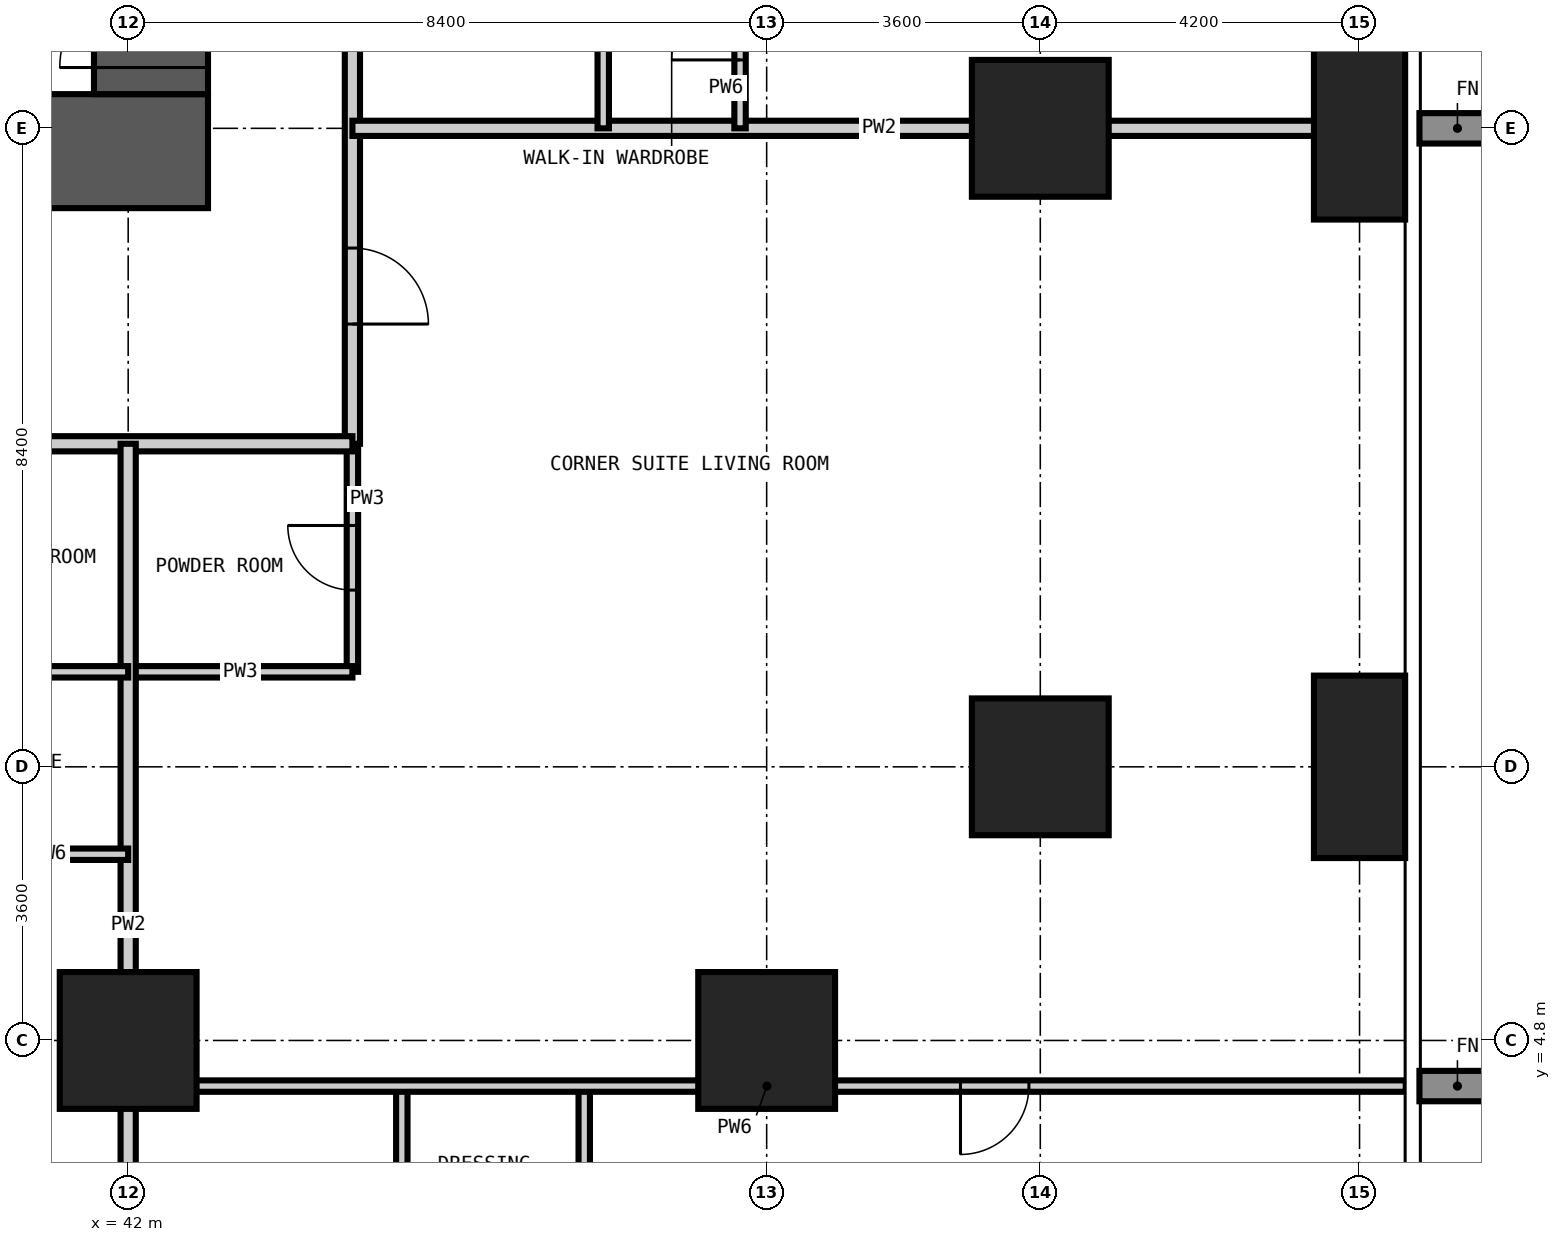
"""IFC4 building model, lengths in metres.
Left out: names, types, materials, properties, quantities, classifications, styles, units other than length and angle.
Written with IfcOpenShell. Run it as: python <this file> out.ifc"""

import sys

from ifc_helpers import new_model, si_unit, direction, frame, frame_2d, origin, origin_2d, place, context, subcontext, project, spatial, rectangle, extrude, element, fill, save


model = new_model("IFC4")
c1 = context("Model", 3, precision=1e-05, world=origin(), true_north=direction((0.0, 1.0)))
c2 = subcontext(c1, "Body", "Model", "MODEL_VIEW")
j1 = project(units=[si_unit("LENGTHUNIT", "METRE"), si_unit("PLANEANGLEUNIT", "RADIAN")], contexts=[c1])
p1 = place(None, origin())
s1 = spatial("IfcSite", under=j1, at=p1, CompositionType="ELEMENT")
p2 = place(p1, origin())
s2 = spatial("IfcBuilding", under=s1, at=p2, CompositionType="ELEMENT")
p3 = place(p2, frame((0.0, 0.0, 52.2)))
s3 = spatial("IfcBuildingStorey", under=s2, at=p3, CompositionType="ELEMENT", Elevation=52.2)
for number, where, z_axis, x_axis in (
    (1, (42.0, 4.8, -0.35), (0.0, 0.0, 1.0), (1.0, 0.0, 0.0)),
    (2, (50.4, 4.8, -0.35), (0.0, 0.0, 1.0), (1.0, 0.0, 0.0)),
    (3, (54.0, 8.4, -0.35), (0.0, 0.0, 1.0), (1.0, 0.0, 0.0)),
    (4, (54.0, 16.8, -0.35), (0.0, 0.0, 1.0), (1.0, 0.0, 0.0)),
):
    element("IfcColumn", number, at=place(p3, frame(where, z_axis=z_axis, x_axis=x_axis)), inside=s3, PredefinedType="COLUMN", context=c2, shape_type="SweptSolid", body=[
        extrude(rectangle(XDim=1.8, YDim=1.8, at=origin_2d()), origin(), (0.0, 0.0, 1.0), 3.6),
    ])
for number, where, z_axis, x_axis in (
    (5, (58.2, 8.4, -0.35), (0.0, 0.0, 1.0), (1.0, 0.0, 0.0)),
    (6, (58.2, 16.8, -0.35), (0.0, 0.0, 1.0), (1.0, 0.0, 0.0)),
):
    element("IfcColumn", number, at=place(p3, frame(where, z_axis=z_axis, x_axis=x_axis)), inside=s3, PredefinedType="COLUMN", context=c2, shape_type="SweptSolid", body=[
        extrude(rectangle(XDim=1.2, YDim=2.4, at=origin_2d()), origin(), (0.0, 0.0, 1.0), 3.6),
    ])
p4 = place(p3, frame((15.75, 16.5, -0.35), z_axis=(0.0, 0.0, 1.0), x_axis=(1.0, 0.0, 0.0)))
e7 = element("IfcWall", 7, at=p4, inside=s3, PredefinedType="SHEAR", context=c2, shape_type="SweptSolid", body=[
    extrude(rectangle(XDim=27.3, YDim=1.5, at=frame_2d((13.65, 0.0))), origin(), (0.0, 0.0, 1.0), 3.6),
])
p5 = place(p4, frame((13.15, 0.0, 0.35)))
e8 = element("IfcOpeningElement", 8, at=p5, cuts=e7, PredefinedType="OPENING", context=c2, shape_type="SweptSolid", body=[
    extrude(rectangle(XDim=1.0, YDim=2.1, at=frame_2d((0.5, 1.05))), frame((0.0, 0.76, 0.0), z_axis=(0.0, -1.0, 0.0), x_axis=(1.0, 0.0, 0.0)), (0.0, 0.0, 1.0), 1.52),
])
p6 = place(p4, frame((19.45, 0.0, 0.35)))
e9 = element("IfcOpeningElement", 9, at=p6, cuts=e7, PredefinedType="OPENING", context=c2, shape_type="SweptSolid", body=[
    extrude(rectangle(XDim=1.0, YDim=2.1, at=frame_2d((0.5, 1.05))), frame((0.0, 0.76, 0.0), z_axis=(0.0, -1.0, 0.0), x_axis=(1.0, 0.0, 0.0)), (0.0, 0.0, 1.0), 1.52),
])
p7 = place(p3, frame((42.3, 17.25, -0.35), z_axis=(0.0, 0.0, 1.0), x_axis=(0.0, 1.0, 0.0)))
e10 = element("IfcWall", 10, at=p7, inside=s3, PredefinedType="SHEAR", context=c2, shape_type="SweptSolid", body=[
    extrude(rectangle(XDim=24.3, YDim=1.5, at=frame_2d((12.15, 0.0))), origin(), (0.0, 0.0, 1.0), 3.6),
])
p8 = place(p7, frame((0.35, 0.0, 0.35)))
e11 = element("IfcOpeningElement", 11, at=p8, cuts=e10, PredefinedType="OPENING", context=c2, shape_type="SweptSolid", body=[
    extrude(rectangle(XDim=1.2, YDim=2.2, at=frame_2d((0.6, 1.1))), frame((0.0, 0.76, 0.0), z_axis=(0.0, -1.0, 0.0), x_axis=(1.0, 0.0, 0.0)), (0.0, 0.0, 1.0), 1.52),
])
p9 = place(p7, frame((11.65, 0.0, 0.35)))
e12 = element("IfcOpeningElement", 12, at=p9, cuts=e10, PredefinedType="OPENING", context=c2, shape_type="SweptSolid", body=[
    extrude(rectangle(XDim=1.0, YDim=2.1, at=frame_2d((0.5, 1.05))), frame((0.0, 0.76, 0.0), z_axis=(0.0, -1.0, 0.0), x_axis=(1.0, 0.0, 0.0)), (0.0, 0.0, 1.0), 1.52),
])
p10 = place(p7, frame((20.05, 0.0, 0.35)))
e13 = element("IfcOpeningElement", 13, at=p10, cuts=e10, PredefinedType="OPENING", context=c2, shape_type="SweptSolid", body=[
    extrude(rectangle(XDim=1.0, YDim=2.1, at=frame_2d((0.5, 1.05))), frame((0.0, 0.76, 0.0), z_axis=(0.0, -1.0, 0.0), x_axis=(1.0, 0.0, 0.0)), (0.0, 0.0, 1.0), 1.52),
])
p11 = place(p3, frame((44.95, 9.65, 0.0), z_axis=(0.0, 0.0, 1.0), x_axis=(0.0, 1.0, 0.0)))
e14 = element("IfcWall", 14, at=p11, inside=s3, PredefinedType="PARTITIONING", context=c2, shape_type="SweptSolid", body=[
    extrude(rectangle(XDim=3.0, YDim=0.15, at=frame_2d((1.5, 0.0))), origin(), (0.0, 0.0, 1.0), 3.25),
])
p12 = place(p11, frame((1.075, 0.0, 0.0)))
e15 = element("IfcOpeningElement", 15, at=p12, cuts=e14, PredefinedType="OPENING", context=c2, shape_type="SweptSolid", body=[
    extrude(rectangle(XDim=0.85, YDim=2.1, at=frame_2d((0.425, 1.05))), frame((0.0, 0.085, 0.0), z_axis=(0.0, -1.0, 0.0), x_axis=(1.0, 0.0, 0.0)), (0.0, 0.0, 1.0), 0.17),
])
p13 = place(p3, frame((42.0, 9.65, 0.0), z_axis=(0.0, 0.0, 1.0), x_axis=(1.0, 0.0, 0.0)))
e16 = element("IfcWall", 16, at=p13, inside=s3, PredefinedType="PARTITIONING", context=c2, shape_type="SweptSolid", body=[
    extrude(rectangle(XDim=2.95, YDim=0.15, at=frame_2d((1.475, 0.0))), origin(), (0.0, 0.0, 1.0), 3.25),
])
p14 = place(p3, frame((44.95, 45.55, 0.0), z_axis=(0.0, 0.0, 1.0), x_axis=(0.0, -1.0, 0.0)))
e17 = element("IfcWall", 17, at=p14, inside=s3, PredefinedType="PARTITIONING", context=c2, shape_type="SweptSolid", body=[
    extrude(rectangle(XDim=32.9, YDim=0.2, at=frame_2d((16.45, 0.0))), origin(), (0.0, 0.0, 1.0), 3.25),
])
p15 = place(p14, frame((24.8, 0.0, 0.0)))
e18 = element("IfcOpeningElement", 18, at=p15, cuts=e17, PredefinedType="OPENING", context=c2, shape_type="SweptSolid", body=[
    extrude(rectangle(XDim=1.0, YDim=2.2, at=frame_2d((0.5, 1.1))), frame((0.0, 0.11, 0.0), z_axis=(0.0, -1.0, 0.0), x_axis=(1.0, 0.0, 0.0)), (0.0, 0.0, 1.0), 0.22),
])
p16 = place(p14, frame((19.85, 0.0, 0.0)))
e19 = element("IfcOpeningElement", 19, at=p16, cuts=e17, PredefinedType="OPENING", context=c2, shape_type="SweptSolid", body=[
    extrude(rectangle(XDim=1.0, YDim=2.2, at=frame_2d((0.5, 1.1))), frame((0.0, 0.11, 0.0), z_axis=(0.0, -1.0, 0.0), x_axis=(1.0, 0.0, 0.0)), (0.0, 0.0, 1.0), 0.22),
])
p17 = place(p14, frame((11.45, 0.0, 0.0)))
e20 = element("IfcOpeningElement", 20, at=p17, cuts=e17, PredefinedType="OPENING", context=c2, shape_type="SweptSolid", body=[
    extrude(rectangle(XDim=1.0, YDim=2.2, at=frame_2d((0.5, 1.1))), frame((0.0, 0.11, 0.0), z_axis=(0.0, -1.0, 0.0), x_axis=(1.0, 0.0, 0.0)), (0.0, 0.0, 1.0), 0.22),
])
p18 = place(p14, frame((6.5, 0.0, 0.0)))
e21 = element("IfcOpeningElement", 21, at=p18, cuts=e17, PredefinedType="OPENING", context=c2, shape_type="SweptSolid", body=[
    extrude(rectangle(XDim=1.0, YDim=2.2, at=frame_2d((0.5, 1.1))), frame((0.0, 0.11, 0.0), z_axis=(0.0, -1.0, 0.0), x_axis=(1.0, 0.0, 0.0)), (0.0, 0.0, 1.0), 0.22),
])
p19 = place(p14, frame((30.325, 0.0, 0.0)))
e22 = element("IfcOpeningElement", 22, at=p19, cuts=e17, PredefinedType="OPENING", context=c2, shape_type="SweptSolid", body=[
    extrude(rectangle(XDim=1.0, YDim=2.2, at=frame_2d((0.5, 1.1))), frame((0.0, 0.11, 0.0), z_axis=(0.0, -1.0, 0.0), x_axis=(1.0, 0.0, 0.0)), (0.0, 0.0, 1.0), 0.22),
])
p20 = place(p14, frame((1.275, 0.0, 0.0)))
e23 = element("IfcOpeningElement", 23, at=p20, cuts=e17, PredefinedType="OPENING", context=c2, shape_type="SweptSolid", body=[
    extrude(rectangle(XDim=1.0, YDim=2.2, at=frame_2d((0.5, 1.1))), frame((0.0, 0.11, 0.0), z_axis=(0.0, -1.0, 0.0), x_axis=(1.0, 0.0, 0.0)), (0.0, 0.0, 1.0), 0.22),
])
p21 = place(p3, frame((44.95, 12.65, 0.0), z_axis=(0.0, 0.0, 1.0), x_axis=(-1.0, 0.0, 0.0)))
e24 = element("IfcWall", 24, at=p21, inside=s3, PredefinedType="PARTITIONING", context=c2, shape_type="SweptSolid", body=[
    extrude(rectangle(XDim=32.3, YDim=0.2, at=frame_2d((16.15, 0.0))), origin(), (0.0, 0.0, 1.0), 3.25),
])
p22 = place(p21, frame((24.35, 0.0, 0.0)))
e25 = element("IfcOpeningElement", 25, at=p22, cuts=e24, PredefinedType="OPENING", context=c2, shape_type="SweptSolid", body=[
    extrude(rectangle(XDim=1.0, YDim=2.2, at=frame_2d((0.5, 1.1))), frame((0.0, 0.11, 0.0), z_axis=(0.0, -1.0, 0.0), x_axis=(1.0, 0.0, 0.0)), (0.0, 0.0, 1.0), 0.22),
])
p23 = place(p21, frame((15.95, 0.0, 0.0)))
e26 = element("IfcOpeningElement", 26, at=p23, cuts=e24, PredefinedType="OPENING", context=c2, shape_type="SweptSolid", body=[
    extrude(rectangle(XDim=1.0, YDim=2.2, at=frame_2d((0.5, 1.1))), frame((0.0, 0.11, 0.0), z_axis=(0.0, -1.0, 0.0), x_axis=(1.0, 0.0, 0.0)), (0.0, 0.0, 1.0), 0.22),
])
p24 = place(p21, frame((7.55, 0.0, 0.0)))
e27 = element("IfcOpeningElement", 27, at=p24, cuts=e24, PredefinedType="OPENING", context=c2, shape_type="SweptSolid", body=[
    extrude(rectangle(XDim=1.0, YDim=2.2, at=frame_2d((0.5, 1.1))), frame((0.0, 0.11, 0.0), z_axis=(0.0, -1.0, 0.0), x_axis=(1.0, 0.0, 0.0)), (0.0, 0.0, 1.0), 0.22),
])
p25 = place(p3, frame((42.0, -0.008, 0.0), z_axis=(0.0, 0.0, 1.0), x_axis=(0.0, 1.0, 0.0)))
e28 = element("IfcWall", 28, at=p25, inside=s3, PredefinedType="PARTITIONING", context=c2, shape_type="SweptSolid", body=[
    extrude(rectangle(XDim=12.658, YDim=0.2, at=frame_2d((6.329, 0.0))), origin(), (0.0, 0.0, 1.0), 3.25),
])
p26 = place(p3, frame((44.95, 16.8, 0.0), z_axis=(0.0, 0.0, 1.0), x_axis=(1.0, 0.0, 0.0)))
e29 = element("IfcWall", 29, at=p26, inside=s3, PredefinedType="PARTITIONING", context=c2, shape_type="SweptSolid", body=[
    extrude(rectangle(XDim=13.858, YDim=0.2, at=frame_2d((6.929, 0.0))), origin(), (0.0, 0.0, 1.0), 3.25),
])
p27 = place(p3, frame((45.6, 1.2, 0.0), z_axis=(0.0, 0.0, 1.0), x_axis=(0.0, 1.0, 0.0)))
e30 = element("IfcWall", 30, at=p27, inside=s3, PredefinedType="PARTITIONING", context=c2, shape_type="SweptSolid", body=[
    extrude(rectangle(XDim=3.0, YDim=0.15, at=frame_2d((1.5, 0.0))), origin(), (0.0, 0.0, 1.0), 3.25),
])
p28 = place(p3, frame((48.0, 1.2, 0.0), z_axis=(0.0, 0.0, 1.0), x_axis=(0.0, 1.0, 0.0)))
e31 = element("IfcWall", 31, at=p28, inside=s3, PredefinedType="PARTITIONING", context=c2, shape_type="SweptSolid", body=[
    extrude(rectangle(XDim=3.0, YDim=0.15, at=frame_2d((1.5, 0.0))), origin(), (0.0, 0.0, 1.0), 3.25),
])
p29 = place(p28, frame((1.05, 0.0, 0.0)))
e32 = element("IfcOpeningElement", 32, at=p29, cuts=e31, PredefinedType="OPENING", context=c2, shape_type="SweptSolid", body=[
    extrude(rectangle(XDim=0.9, YDim=2.1, at=frame_2d((0.45, 1.05))), frame((0.0, 0.085, 0.0), z_axis=(0.0, -1.0, 0.0), x_axis=(1.0, 0.0, 0.0)), (0.0, 0.0, 1.0), 0.17),
])
p30 = place(p3, frame((48.25, 16.8, 0.0), z_axis=(0.0, 0.0, 1.0), x_axis=(0.0, 1.0, 0.0)))
e33 = element("IfcWall", 33, at=p30, inside=s3, PredefinedType="PARTITIONING", context=c2, shape_type="SweptSolid", body=[
    extrude(rectangle(XDim=2.7, YDim=0.15, at=frame_2d((1.35, 0.0))), origin(), (0.0, 0.0, 1.0), 3.25),
])
p31 = place(p3, frame((50.05, 16.8, 0.0), z_axis=(0.0, 0.0, 1.0), x_axis=(0.0, 1.0, 0.0)))
e34 = element("IfcWall", 34, at=p31, inside=s3, PredefinedType="PARTITIONING", context=c2, shape_type="SweptSolid", body=[
    extrude(rectangle(XDim=2.7, YDim=0.15, at=frame_2d((1.35, 0.0))), origin(), (0.0, 0.0, 1.0), 3.25),
])
p32 = place(p31, frame((0.9, 0.0, 0.0)))
e35 = element("IfcOpeningElement", 35, at=p32, cuts=e34, PredefinedType="OPENING", context=c2, shape_type="SweptSolid", body=[
    extrude(rectangle(XDim=0.9, YDim=2.1, at=frame_2d((0.45, 1.05))), frame((0.0, 0.085, 0.0), z_axis=(0.0, -1.0, 0.0), x_axis=(1.0, 0.0, 0.0)), (0.0, 0.0, 1.0), 0.17),
])
p33 = place(p3, frame((42.0, 4.2, 0.0), z_axis=(0.0, 0.0, 1.0), x_axis=(1.0, 0.0, 0.0)))
e36 = element("IfcWall", 36, at=p33, inside=s3, PredefinedType="PARTITIONING", context=c2, shape_type="SweptSolid", body=[
    extrude(rectangle(XDim=16.808, YDim=0.15, at=frame_2d((8.404, 0.0))), origin(), (0.0, 0.0, 1.0), 3.25),
])
p34 = place(p33, frame((10.95, 0.0, 0.0)))
e37 = element("IfcOpeningElement", 37, at=p34, cuts=e36, PredefinedType="OPENING", context=c2, shape_type="SweptSolid", body=[
    extrude(rectangle(XDim=0.9, YDim=2.1, at=frame_2d((0.45, 1.05))), frame((0.0, 0.085, 0.0), z_axis=(0.0, -1.0, 0.0), x_axis=(1.0, 0.0, 0.0)), (0.0, 0.0, 1.0), 0.17),
])
p35 = place(p3, frame((37.8, 7.25, 0.0), z_axis=(0.0, 0.0, 1.0), x_axis=(1.0, 0.0, 0.0)))
e38 = element("IfcWall", 38, at=p35, inside=s3, PredefinedType="PARTITIONING", context=c2, shape_type="SweptSolid", body=[
    extrude(rectangle(XDim=4.2, YDim=0.15, at=frame_2d((2.1, 0.0))), origin(), (0.0, 0.0, 1.0), 3.25),
])
p36 = place(p35, frame((1.65, 0.0, 0.0)))
e39 = element("IfcOpeningElement", 39, at=p36, cuts=e38, PredefinedType="OPENING", context=c2, shape_type="SweptSolid", body=[
    extrude(rectangle(XDim=0.9, YDim=2.1, at=frame_2d((0.45, 1.05))), frame((0.0, 0.085, 0.0), z_axis=(0.0, -1.0, 0.0), x_axis=(1.0, 0.0, 0.0)), (0.0, 0.0, 1.0), 0.17),
])
p37 = place(p3, frame((37.8, 9.65, 0.0), z_axis=(0.0, 0.0, 1.0), x_axis=(1.0, 0.0, 0.0)))
e40 = element("IfcWall", 40, at=p37, inside=s3, PredefinedType="PARTITIONING", context=c2, shape_type="SweptSolid", body=[
    extrude(rectangle(XDim=4.2, YDim=0.15, at=frame_2d((2.1, 0.0))), origin(), (0.0, 0.0, 1.0), 3.25),
])
p38 = place(p8, origin())
e41 = element("IfcDoor", 41, at=p38, inside=s3, OperationType="SINGLE_SWING_LEFT", PredefinedType="DOOR", context=c2, shape_type="SweptSolid", body=[
    extrude(rectangle(XDim=1.2, YDim=2.2, at=frame_2d((0.6, 1.1))), frame((0.0, 0.025, 0.0), z_axis=(0.0, -1.0, 0.0), x_axis=(1.0, 0.0, 0.0)), (0.0, 0.0, 1.0), 0.05),
])
fill(e11, e41)
p39 = place(p32, origin())
e42 = element("IfcDoor", 42, at=p39, inside=s3, OperationType="SINGLE_SWING_LEFT", PredefinedType="DOOR", context=c2, shape_type="SweptSolid", body=[
    extrude(rectangle(XDim=0.9, YDim=2.1, at=frame_2d((0.45, 1.05))), frame((0.0, 0.025, 0.0), z_axis=(0.0, -1.0, 0.0), x_axis=(1.0, 0.0, 0.0)), (0.0, 0.0, 1.0), 0.05),
])
fill(e35, e42)
p40 = place(p19, origin())
e43 = element("IfcDoor", 43, at=p40, inside=s3, OperationType="SINGLE_SWING_RIGHT", PredefinedType="DOOR", context=c2, shape_type="SweptSolid", body=[
    extrude(rectangle(XDim=1.0, YDim=2.2, at=frame_2d((0.5, 1.1))), frame((0.0, 0.025, 0.0), z_axis=(0.0, -1.0, 0.0), x_axis=(1.0, 0.0, 0.0)), (0.0, 0.0, 1.0), 0.05),
])
fill(e22, e43)
p41 = place(p12, origin())
e44 = element("IfcDoor", 44, at=p41, inside=s3, OperationType="SINGLE_SWING_RIGHT", PredefinedType="DOOR", context=c2, shape_type="SweptSolid", body=[
    extrude(rectangle(XDim=0.85, YDim=2.1, at=frame_2d((0.425, 1.05))), frame((0.0, 0.025, 0.0), z_axis=(0.0, -1.0, 0.0), x_axis=(1.0, 0.0, 0.0)), (0.0, 0.0, 1.0), 0.05),
])
fill(e15, e44)
p42 = place(p34, frame((0.9, 0.0, 0.0), z_axis=(0.0, 0.0, 1.0), x_axis=(-1.0, 0.0, 0.0)))
e45 = element("IfcDoor", 45, at=p42, inside=s3, OperationType="SINGLE_SWING_RIGHT", PredefinedType="DOOR", context=c2, shape_type="SweptSolid", body=[
    extrude(rectangle(XDim=0.9, YDim=2.1, at=frame_2d((0.45, 1.05))), frame((0.0, 0.025, 0.0), z_axis=(0.0, -1.0, 0.0), x_axis=(1.0, 0.0, 0.0)), (0.0, 0.0, 1.0), 0.05),
])
fill(e37, e45)
save(model, sys.argv[1])
